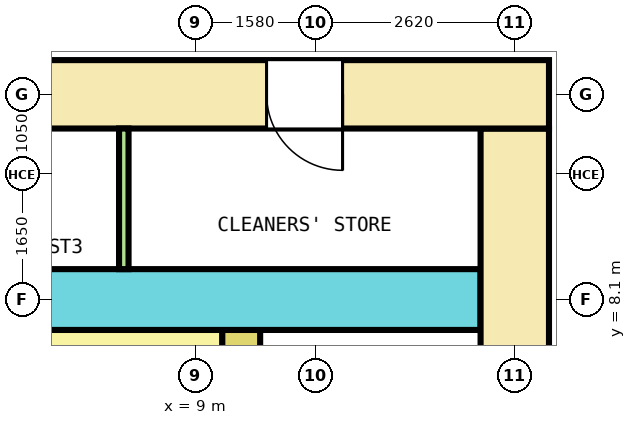
"""IFC4 building model, lengths in metres.
Left out: names, types, materials, properties, quantities, classifications, styles, units other than length and angle.
Written with IfcOpenShell. Run it as: python <this file> out.ifc"""

import sys

from ifc_helpers import new_model, si_unit, direction, frame, frame_2d, origin, place, context, subcontext, project, spatial, rectangle, extrude, element, fill, save


model = new_model("IFC4")
c1 = context("Model", 3, precision=1e-05, world=origin(), true_north=direction((0.0, 1.0)))
c2 = subcontext(c1, "Body", "Model", "MODEL_VIEW")
j1 = project(units=[si_unit("LENGTHUNIT", "METRE"), si_unit("PLANEANGLEUNIT", "RADIAN")], contexts=[c1])
p1 = place(None, origin())
s1 = spatial("IfcSite", under=j1, at=p1, CompositionType="ELEMENT")
p2 = place(p1, origin())
s2 = spatial("IfcBuilding", under=s1, at=p2, CompositionType="ELEMENT")
p3 = place(p2, frame((0.0, 0.0, 27.8)))
s3 = spatial("IfcBuildingStorey", under=s2, at=p3, CompositionType="ELEMENT", Elevation=27.8)
p4 = place(p3, frame((-13.65, 10.8, 0.0), z_axis=(0.0, 0.0, 1.0), x_axis=(1.0, 0.0, 0.0)))
e1 = element("IfcWall", 1, at=p4, inside=s3, PredefinedType="SHEAR", context=c2, shape_type="SweptSolid", body=[
    extrude(rectangle(XDim=27.3, YDim=0.9, at=frame_2d((13.65, 0.0))), origin(), (0.0, 0.0, 1.0), 4.1),
])
p5 = place(p4, frame((2.4, 0.0, 0.0)))
e2 = element("IfcOpeningElement", 2, at=p5, cuts=e1, PredefinedType="OPENING", context=c2, shape_type="SweptSolid", body=[
    extrude(rectangle(XDim=1.0, YDim=2.1, at=frame_2d((0.5, 1.05))), frame((0.0, 0.46, 0.0), z_axis=(0.0, -1.0, 0.0), x_axis=(1.0, 0.0, 0.0)), (0.0, 0.0, 1.0), 0.92),
])
p6 = place(p4, frame((6.494, 0.0, 0.0)))
e3 = element("IfcOpeningElement", 3, at=p6, cuts=e1, PredefinedType="OPENING", context=c2, shape_type="SweptSolid", body=[
    extrude(rectangle(XDim=1.0, YDim=2.1, at=frame_2d((0.5, 1.05))), frame((0.0, 0.46, 0.0), z_axis=(0.0, -1.0, 0.0), x_axis=(1.0, 0.0, 0.0)), (0.0, 0.0, 1.0), 0.92),
])
p7 = place(p4, frame((10.556, 0.0, 0.0)))
e4 = element("IfcOpeningElement", 4, at=p7, cuts=e1, PredefinedType="OPENING", context=c2, shape_type="SweptSolid", body=[
    extrude(rectangle(XDim=1.0, YDim=2.1, at=frame_2d((0.5, 1.05))), frame((0.0, 0.46, 0.0), z_axis=(0.0, -1.0, 0.0), x_axis=(1.0, 0.0, 0.0)), (0.0, 0.0, 1.0), 0.92),
])
p8 = place(p4, frame((18.859, 0.0, 0.0)))
e5 = element("IfcOpeningElement", 5, at=p8, cuts=e1, PredefinedType="OPENING", context=c2, shape_type="SweptSolid", body=[
    extrude(rectangle(XDim=1.0, YDim=2.1, at=frame_2d((0.5, 1.05))), frame((0.0, 0.46, 0.0), z_axis=(0.0, -1.0, 0.0), x_axis=(1.0, 0.0, 0.0)), (0.0, 0.0, 1.0), 0.92),
])
p9 = place(p4, frame((23.584, 0.0, 0.0)))
e6 = element("IfcOpeningElement", 6, at=p9, cuts=e1, PredefinedType="OPENING", context=c2, shape_type="SweptSolid", body=[
    extrude(rectangle(XDim=1.0, YDim=2.1, at=frame_2d((0.5, 1.05))), frame((0.0, 0.46, 0.0), z_axis=(0.0, -1.0, 0.0), x_axis=(1.0, 0.0, 0.0)), (0.0, 0.0, 1.0), 0.92),
])
p10 = place(p4, frame((14.575, 0.0, 0.0)))
e7 = element("IfcOpeningElement", 7, at=p10, cuts=e1, PredefinedType="OPENING", context=c2, shape_type="SweptSolid", body=[
    extrude(rectangle(XDim=1.4, YDim=2.1, at=frame_2d((0.7, 1.05))), frame((0.0, 0.46, 0.0), z_axis=(0.0, -1.0, 0.0), x_axis=(1.0, 0.0, 0.0)), (0.0, 0.0, 1.0), 0.92),
])
p11 = place(p3, frame((13.2, -10.35, 0.0), z_axis=(0.0, 0.0, 1.0), x_axis=(0.0, 1.0, 0.0)))
e8 = element("IfcWall", 8, at=p11, inside=s3, PredefinedType="SHEAR", context=c2, shape_type="SweptSolid", body=[
    extrude(rectangle(XDim=20.7, YDim=0.9, at=frame_2d((10.35, 0.0))), origin(), (0.0, 0.0, 1.0), 4.1),
])
p12 = place(p11, frame((9.15, 0.0, 0.0)))
e9 = element("IfcOpeningElement", 9, at=p12, cuts=e8, PredefinedType="OPENING", context=c2, shape_type="SweptSolid", body=[
    extrude(rectangle(XDim=2.4, YDim=2.1, at=frame_2d((1.2, 1.05))), frame((0.0, 0.46, 0.0), z_axis=(0.0, -1.0, 0.0), x_axis=(1.0, 0.0, 0.0)), (0.0, 0.0, 1.0), 0.92),
])
p13 = place(p11, frame((16.05, 0.0, 0.0)))
e10 = element("IfcOpeningElement", 10, at=p13, cuts=e8, PredefinedType="OPENING", context=c2, shape_type="SweptSolid", body=[
    extrude(rectangle(XDim=1.2, YDim=2.1, at=frame_2d((0.6, 1.05))), frame((0.0, 0.46, 0.0), z_axis=(0.0, -1.0, 0.0), x_axis=(1.0, 0.0, 0.0)), (0.0, 0.0, 1.0), 0.92),
])
p14 = place(p11, frame((2.819, 0.0, 0.0)))
e11 = element("IfcOpeningElement", 11, at=p14, cuts=e8, PredefinedType="OPENING", context=c2, shape_type="SweptSolid", body=[
    extrude(rectangle(XDim=1.0, YDim=2.1, at=frame_2d((0.5, 1.05))), frame((0.0, 0.46, 0.0), z_axis=(0.0, -1.0, 0.0), x_axis=(1.0, 0.0, 0.0)), (0.0, 0.0, 1.0), 0.92),
])
p15 = place(p11, frame((4.281, 0.0, 0.0)))
e12 = element("IfcOpeningElement", 12, at=p15, cuts=e8, PredefinedType="OPENING", context=c2, shape_type="SweptSolid", body=[
    extrude(rectangle(XDim=1.0, YDim=2.1, at=frame_2d((0.5, 1.05))), frame((0.0, 0.46, 0.0), z_axis=(0.0, -1.0, 0.0), x_axis=(1.0, 0.0, 0.0)), (0.0, 0.0, 1.0), 0.92),
])
p16 = place(p3, frame((-12.75, 8.1, 0.0), z_axis=(0.0, 0.0, 1.0), x_axis=(1.0, 0.0, 0.0)))
e13 = element("IfcWall", 13, at=p16, inside=s3, PredefinedType="SHEAR", context=c2, shape_type="SweptSolid", body=[
    extrude(rectangle(XDim=25.5, YDim=0.8, at=frame_2d((12.75, 0.0))), origin(), (0.0, 0.0, 1.0), 4.1),
])
p17 = place(p16, frame((13.675, 0.0, 0.0)))
e14 = element("IfcOpeningElement", 14, at=p17, cuts=e13, PredefinedType="OPENING", context=c2, shape_type="SweptSolid", body=[
    extrude(rectangle(XDim=1.4, YDim=2.1, at=frame_2d((0.7, 1.05))), frame((0.0, 0.41, 0.0), z_axis=(0.0, -1.0, 0.0), x_axis=(1.0, 0.0, 0.0)), (0.0, 0.0, 1.0), 0.82),
])
p18 = place(p3, frame((9.6, -7.7, 0.0), z_axis=(0.0, 0.0, 1.0), x_axis=(0.0, 1.0, 0.0)))
e15 = element("IfcWall", 15, at=p18, inside=s3, PredefinedType="SHEAR", context=c2, shape_type="SweptSolid", body=[
    extrude(rectangle(XDim=15.4, YDim=0.5, at=frame_2d((7.7, 0.0))), origin(), (0.0, 0.0, 1.0), 4.1),
])
p19 = place(p18, frame((6.5, 0.0, 0.0)))
e16 = element("IfcOpeningElement", 16, at=p19, cuts=e15, PredefinedType="OPENING", context=c2, shape_type="SweptSolid", body=[
    extrude(rectangle(XDim=2.4, YDim=2.1, at=frame_2d((1.2, 1.05))), frame((0.0, 0.26, 0.0), z_axis=(0.0, -1.0, 0.0), x_axis=(1.0, 0.0, 0.0)), (0.0, 0.0, 1.0), 0.52),
])
p20 = place(p18, frame((13.4, 0.0, 0.0)))
e17 = element("IfcOpeningElement", 17, at=p20, cuts=e15, PredefinedType="OPENING", context=c2, shape_type="SweptSolid", body=[
    extrude(rectangle(XDim=1.2, YDim=2.1, at=frame_2d((0.6, 1.05))), frame((0.0, 0.26, 0.0), z_axis=(0.0, -1.0, 0.0), x_axis=(1.0, 0.0, 0.0)), (0.0, 0.0, 1.0), 0.52),
])
p21 = place(p18, frame((0.9, 0.0, 0.0)))
e18 = element("IfcOpeningElement", 18, at=p21, cuts=e15, PredefinedType="OPENING", context=c2, shape_type="SweptSolid", body=[
    extrude(rectangle(XDim=1.0, YDim=2.1, at=frame_2d((0.5, 1.05))), frame((0.0, 0.26, 0.0), z_axis=(0.0, -1.0, 0.0), x_axis=(1.0, 0.0, 0.0)), (0.0, 0.0, 1.0), 0.52),
])
p22 = place(p3, frame((3.55, 7.575, 0.0), z_axis=(0.0, 0.0, 1.0), x_axis=(1.0, 0.0, 0.0)))
e19 = element("IfcWall", 19, at=p22, inside=s3, PredefinedType="SOLIDWALL", context=c2, shape_type="SweptSolid", body=[
    extrude(rectangle(XDim=5.8, YDim=0.25, at=frame_2d((2.9, 0.0))), origin(), (0.0, 0.0, 1.0), 4.1),
])
p23 = place(p3, frame((8.056, 8.5, 0.0), z_axis=(0.0, 0.0, 1.0), x_axis=(0.0, 1.0, 0.0)))
e20 = element("IfcWall", 20, at=p23, inside=s3, PredefinedType="PARTITIONING", context=c2, shape_type="SweptSolid", body=[
    extrude(rectangle(XDim=1.85, YDim=0.125, at=frame_2d((0.925, 0.0))), origin(), (0.0, 0.0, 1.0), 4.1),
])
p24 = place(p9, origin())
e21 = element("IfcDoor", 21, at=p24, inside=s3, OperationType="SINGLE_SWING_LEFT", PredefinedType="DOOR", context=c2, shape_type="SweptSolid", body=[
    extrude(rectangle(XDim=1.0, YDim=2.1, at=frame_2d((0.5, 1.05))), frame((0.0, 0.3, 0.0), z_axis=(0.0, -1.0, 0.0), x_axis=(1.0, 0.0, 0.0)), (0.0, 0.0, 1.0), 0.6),
])
fill(e6, e21)
save(model, sys.argv[1])
